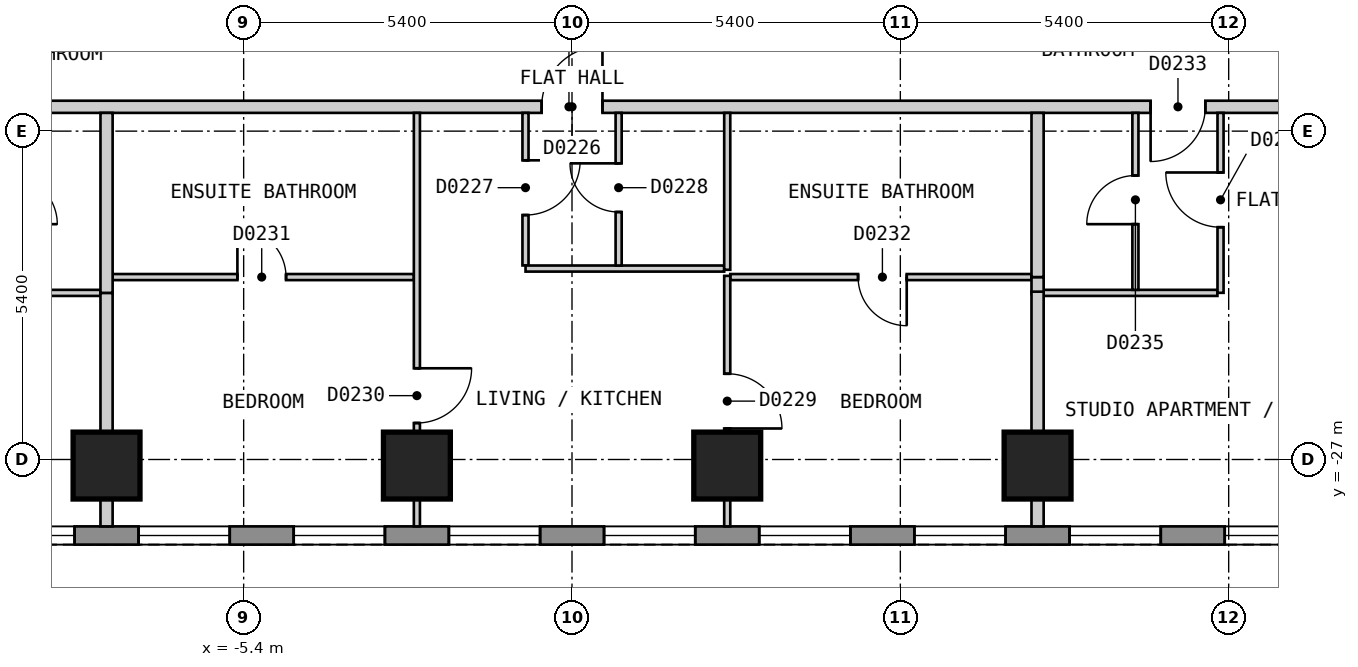
"""IFC4 building model, lengths in metres.
Left out: names, types, materials, properties, quantities, classifications, styles, units other than length and angle.
Written with IfcOpenShell. Run it as: python <this file> out.ifc"""

import sys

from ifc_helpers import new_model, si_unit, direction, frame, frame_2d, origin, origin_2d, place, context, subcontext, project, spatial, polyline, rectangle, outline, extrude, element, fill, save


model = new_model("IFC4")
c1 = context("Model", 3, precision=1e-05, world=origin(), true_north=direction((0.0, 1.0)))
c2 = subcontext(c1, "Body", "Model", "MODEL_VIEW")
j1 = project(units=[si_unit("LENGTHUNIT", "METRE"), si_unit("PLANEANGLEUNIT", "RADIAN")], contexts=[c1])
p1 = place(None, origin())
s1 = spatial("IfcSite", under=j1, at=p1, CompositionType="ELEMENT")
p2 = place(p1, origin())
s2 = spatial("IfcBuilding", under=s1, at=p2, CompositionType="ELEMENT")
p3 = place(p2, frame((0.0, 0.0, 41.4)))
s3 = spatial("IfcBuildingStorey", under=s2, at=p3, CompositionType="ELEMENT", Elevation=41.4)
for number, where, z_axis, x_axis in (
    (1, (-7.655, -27.1, 0.0), (0.0, 0.0, 1.0), (1.0, 0.0, 0.0)),
    (2, (-2.551, -27.1, 0.0), (0.0, 0.0, 1.0), (1.0, 0.0, 0.0)),
    (3, (2.553, -27.1, 0.0), (0.0, 0.0, 1.0), (1.0, 0.0, 0.0)),
    (4, (7.657, -27.1, 0.0), (0.0, 0.0, 1.0), (1.0, 0.0, 0.0)),
):
    element("IfcColumn", number, at=place(p3, frame(where, z_axis=z_axis, x_axis=x_axis)), inside=s3, PredefinedType="COLUMN", context=c2, shape_type="SweptSolid", body=[
        extrude(rectangle(XDim=1.1, YDim=1.1, at=origin_2d()), origin(), (0.0, 0.0, 1.0), 3.0),
    ])
p4 = place(p3, frame((-13.51, -28.25, 0.0), z_axis=(0.0, 0.0, 1.0), x_axis=(1.0, 0.0, 0.0)))
e5 = element("IfcWall", 5, at=p4, inside=s3, PredefinedType="SOLIDWALL", context=c2, shape_type="SweptSolid", body=[
    extrude(outline(polyline([(0.0, -0.15), (27.02, -0.15), (26.94, 0.15), (0.08, 0.15), (0.0, -0.15)])), origin(), (0.0, 0.0, 1.0), 2.7),
])
p5 = place(p4, frame((1.277, 0.0, 0.15)))
e6 = element("IfcOpeningElement", 6, at=p5, cuts=e5, PredefinedType="OPENING", context=c2, shape_type="SweptSolid", body=[
    extrude(rectangle(XDim=1.5, YDim=2.1, at=frame_2d((0.75, 1.05))), frame((0.0, 0.16, 0.0), z_axis=(0.0, -1.0, 0.0), x_axis=(1.0, 0.0, 0.0)), (0.0, 0.0, 1.0), 0.32),
])
p6 = place(p4, frame((3.829, 0.0, 0.15)))
e7 = element("IfcOpeningElement", 7, at=p6, cuts=e5, PredefinedType="OPENING", context=c2, shape_type="SweptSolid", body=[
    extrude(rectangle(XDim=1.5, YDim=2.1, at=frame_2d((0.75, 1.05))), frame((0.0, 0.16, 0.0), z_axis=(0.0, -1.0, 0.0), x_axis=(1.0, 0.0, 0.0)), (0.0, 0.0, 1.0), 0.32),
])
p7 = place(p4, frame((6.381, 0.0, 0.15)))
e8 = element("IfcOpeningElement", 8, at=p7, cuts=e5, PredefinedType="OPENING", context=c2, shape_type="SweptSolid", body=[
    extrude(rectangle(XDim=1.5, YDim=2.1, at=frame_2d((0.75, 1.05))), frame((0.0, 0.16, 0.0), z_axis=(0.0, -1.0, 0.0), x_axis=(1.0, 0.0, 0.0)), (0.0, 0.0, 1.0), 0.32),
])
p8 = place(p4, frame((8.933, 0.0, 0.15)))
e9 = element("IfcOpeningElement", 9, at=p8, cuts=e5, PredefinedType="OPENING", context=c2, shape_type="SweptSolid", body=[
    extrude(rectangle(XDim=1.5, YDim=2.1, at=frame_2d((0.75, 1.05))), frame((0.0, 0.16, 0.0), z_axis=(0.0, -1.0, 0.0), x_axis=(1.0, 0.0, 0.0)), (0.0, 0.0, 1.0), 0.32),
])
p9 = place(p4, frame((11.485, 0.0, 0.15)))
e10 = element("IfcOpeningElement", 10, at=p9, cuts=e5, PredefinedType="OPENING", context=c2, shape_type="SweptSolid", body=[
    extrude(rectangle(XDim=1.5, YDim=2.1, at=frame_2d((0.75, 1.05))), frame((0.0, 0.16, 0.0), z_axis=(0.0, -1.0, 0.0), x_axis=(1.0, 0.0, 0.0)), (0.0, 0.0, 1.0), 0.32),
])
p10 = place(p4, frame((14.037, 0.0, 0.15)))
e11 = element("IfcOpeningElement", 11, at=p10, cuts=e5, PredefinedType="OPENING", context=c2, shape_type="SweptSolid", body=[
    extrude(rectangle(XDim=1.5, YDim=2.1, at=frame_2d((0.75, 1.05))), frame((0.0, 0.16, 0.0), z_axis=(0.0, -1.0, 0.0), x_axis=(1.0, 0.0, 0.0)), (0.0, 0.0, 1.0), 0.32),
])
p11 = place(p4, frame((16.589, 0.0, 0.15)))
e12 = element("IfcOpeningElement", 12, at=p11, cuts=e5, PredefinedType="OPENING", context=c2, shape_type="SweptSolid", body=[
    extrude(rectangle(XDim=1.5, YDim=2.1, at=frame_2d((0.75, 1.05))), frame((0.0, 0.16, 0.0), z_axis=(0.0, -1.0, 0.0), x_axis=(1.0, 0.0, 0.0)), (0.0, 0.0, 1.0), 0.32),
])
p12 = place(p4, frame((19.141, 0.0, 0.15)))
e13 = element("IfcOpeningElement", 13, at=p12, cuts=e5, PredefinedType="OPENING", context=c2, shape_type="SweptSolid", body=[
    extrude(rectangle(XDim=1.5, YDim=2.1, at=frame_2d((0.75, 1.05))), frame((0.0, 0.16, 0.0), z_axis=(0.0, -1.0, 0.0), x_axis=(1.0, 0.0, 0.0)), (0.0, 0.0, 1.0), 0.32),
])
p13 = place(p4, frame((21.693, 0.0, 0.15)))
e14 = element("IfcOpeningElement", 14, at=p13, cuts=e5, PredefinedType="OPENING", context=c2, shape_type="SweptSolid", body=[
    extrude(rectangle(XDim=1.5, YDim=2.1, at=frame_2d((0.75, 1.05))), frame((0.0, 0.16, 0.0), z_axis=(0.0, -1.0, 0.0), x_axis=(1.0, 0.0, 0.0)), (0.0, 0.0, 1.0), 0.32),
])
p14 = place(p4, frame((24.245, 0.0, 0.15)))
e15 = element("IfcOpeningElement", 15, at=p14, cuts=e5, PredefinedType="OPENING", context=c2, shape_type="SweptSolid", body=[
    extrude(rectangle(XDim=1.5, YDim=2.1, at=frame_2d((0.75, 1.05))), frame((0.0, 0.16, 0.0), z_axis=(0.0, -1.0, 0.0), x_axis=(1.0, 0.0, 0.0)), (0.0, 0.0, 1.0), 0.32),
])
p15 = place(p3, frame((-15.499, -21.2, 0.0), z_axis=(0.0, 0.0, 1.0), x_axis=(1.0, 0.0, 0.0)))
e16 = element("IfcWall", 16, at=p15, inside=s3, PredefinedType="PARTITIONING", context=c2, shape_type="SweptSolid", body=[
    extrude(rectangle(XDim=30.898, YDim=0.2, at=frame_2d((15.449, 0.0))), origin(), (0.0, 0.0, 1.0), 2.7),
])
p16 = place(p15, frame((5.084, 0.0, 0.0)))
e17 = element("IfcOpeningElement", 17, at=p16, cuts=e16, PredefinedType="OPENING", context=c2, shape_type="SweptSolid", body=[
    extrude(rectangle(XDim=0.9, YDim=2.1, at=frame_2d((0.45, 1.05))), frame((0.0, 0.11, 0.0), z_axis=(0.0, -1.0, 0.0), x_axis=(1.0, 0.0, 0.0)), (0.0, 0.0, 1.0), 0.22),
])
p17 = place(p15, frame((15.0, 0.0, 0.0)))
e18 = element("IfcOpeningElement", 18, at=p17, cuts=e16, PredefinedType="OPENING", context=c2, shape_type="SweptSolid", body=[
    extrude(rectangle(XDim=1.0, YDim=2.1, at=frame_2d((0.5, 1.05))), frame((0.0, 0.11, 0.0), z_axis=(0.0, -1.0, 0.0), x_axis=(1.0, 0.0, 0.0)), (0.0, 0.0, 1.0), 0.22),
])
p18 = place(p15, frame((25.015, 0.0, 0.0)))
e19 = element("IfcOpeningElement", 19, at=p18, cuts=e16, PredefinedType="OPENING", context=c2, shape_type="SweptSolid", body=[
    extrude(rectangle(XDim=0.9, YDim=2.1, at=frame_2d((0.45, 1.05))), frame((0.0, 0.11, 0.0), z_axis=(0.0, -1.0, 0.0), x_axis=(1.0, 0.0, 0.0)), (0.0, 0.0, 1.0), 0.22),
])
p19 = place(p3, frame((-0.765, -21.3, 0.0), z_axis=(0.0, 0.0, 1.0), x_axis=(0.0, -1.0, 0.0)))
e20 = element("IfcWall", 20, at=p19, inside=s3, PredefinedType="PARTITIONING", context=c2, shape_type="SweptSolid", body=[
    extrude(rectangle(XDim=2.509, YDim=0.1, at=frame_2d((1.254, 0.0))), origin(), (0.0, 0.0, 1.0), 2.7),
])
p20 = place(p19, frame((0.78, 0.0, 0.0)))
e21 = element("IfcOpeningElement", 21, at=p20, cuts=e20, PredefinedType="OPENING", context=c2, shape_type="SweptSolid", body=[
    extrude(rectangle(XDim=0.9, YDim=2.1, at=frame_2d((0.45, 1.05))), frame((0.0, 0.06, 0.0), z_axis=(0.0, -1.0, 0.0), x_axis=(1.0, 0.0, 0.0)), (0.0, 0.0, 1.0), 0.12),
])
p21 = place(p3, frame((-0.764, -23.86, 0.0), z_axis=(0.0, 0.0, 1.0), x_axis=(1.0, 0.0, 0.0)))
e22 = element("IfcWall", 22, at=p21, inside=s3, PredefinedType="PARTITIONING", context=c2, shape_type="SweptSolid", body=[
    extrude(rectangle(XDim=3.267, YDim=0.1, at=frame_2d((1.633, 0.0))), origin(), (0.0, 0.0, 1.0), 2.7),
])
p22 = place(p3, frame((-7.555, -24.0, 0.0), z_axis=(0.0, 0.0, 1.0), x_axis=(1.0, 0.0, 0.0)))
e23 = element("IfcWall", 23, at=p22, inside=s3, PredefinedType="PARTITIONING", context=c2, shape_type="SweptSolid", body=[
    extrude(rectangle(XDim=4.954, YDim=0.1, at=frame_2d((2.477, 0.0))), origin(), (0.0, 0.0, 1.0), 2.7),
])
p23 = place(p22, frame((2.052, 0.0, 0.0)))
e24 = element("IfcOpeningElement", 24, at=p23, cuts=e23, PredefinedType="OPENING", context=c2, shape_type="SweptSolid", body=[
    extrude(rectangle(XDim=0.8, YDim=2.1, at=frame_2d((0.4, 1.05))), frame((0.0, 0.06, 0.0), z_axis=(0.0, -1.0, 0.0), x_axis=(1.0, 0.0, 0.0)), (0.0, 0.0, 1.0), 0.12),
])
p24 = place(p3, frame((2.603, -24.0, 0.0), z_axis=(0.0, 0.0, 1.0), x_axis=(1.0, 0.0, 0.0)))
e25 = element("IfcWall", 25, at=p24, inside=s3, PredefinedType="PARTITIONING", context=c2, shape_type="SweptSolid", body=[
    extrude(rectangle(XDim=4.954, YDim=0.1, at=frame_2d((2.477, 0.0))), origin(), (0.0, 0.0, 1.0), 2.7),
])
p25 = place(p24, frame((2.102, 0.0, 0.0)))
e26 = element("IfcOpeningElement", 26, at=p25, cuts=e25, PredefinedType="OPENING", context=c2, shape_type="SweptSolid", body=[
    extrude(rectangle(XDim=0.8, YDim=2.1, at=frame_2d((0.4, 1.05))), frame((0.0, 0.06, 0.0), z_axis=(0.0, -1.0, 0.0), x_axis=(1.0, 0.0, 0.0)), (0.0, 0.0, 1.0), 0.12),
])
p26 = place(p3, frame((-10.664, -24.26, 0.0), z_axis=(0.0, 0.0, 1.0), x_axis=(1.0, 0.0, 0.0)))
e27 = element("IfcWall", 27, at=p26, inside=s3, PredefinedType="PARTITIONING", context=c2, shape_type="SweptSolid", body=[
    extrude(rectangle(XDim=2.909, YDim=0.1, at=frame_2d((1.455, 0.0))), origin(), (0.0, 0.0, 1.0), 2.7),
])
p27 = place(p3, frame((7.757, -24.26, 0.0), z_axis=(0.0, 0.0, 1.0), x_axis=(1.0, 0.0, 0.0)))
e28 = element("IfcWall", 28, at=p27, inside=s3, PredefinedType="PARTITIONING", context=c2, shape_type="SweptSolid", body=[
    extrude(rectangle(XDim=2.858, YDim=0.1, at=frame_2d((1.429, 0.0))), origin(), (0.0, 0.0, 1.0), 2.7),
])
p28 = place(p3, frame((0.767, -23.81, 0.0), z_axis=(0.0, 0.0, 1.0), x_axis=(0.0, 1.0, 0.0)))
e29 = element("IfcWall", 29, at=p28, inside=s3, PredefinedType="PARTITIONING", context=c2, shape_type="SweptSolid", body=[
    extrude(rectangle(XDim=2.51, YDim=0.1, at=frame_2d((1.255, 0.0))), origin(), (0.0, 0.0, 1.0), 2.7),
])
p29 = place(p28, frame((0.88, 0.0, 0.0)))
e30 = element("IfcOpeningElement", 30, at=p29, cuts=e29, PredefinedType="OPENING", context=c2, shape_type="SweptSolid", body=[
    extrude(rectangle(XDim=0.8, YDim=2.1, at=frame_2d((0.4, 1.05))), frame((0.0, 0.06, 0.0), z_axis=(0.0, -1.0, 0.0), x_axis=(1.0, 0.0, 0.0)), (0.0, 0.0, 1.0), 0.12),
])
p30 = place(p3, frame((9.266, -24.21, 0.0), z_axis=(0.0, 0.0, 1.0), x_axis=(0.0, 1.0, 0.0)))
e31 = element("IfcWall", 31, at=p30, inside=s3, PredefinedType="PARTITIONING", context=c2, shape_type="SweptSolid", body=[
    extrude(rectangle(XDim=2.91, YDim=0.1, at=frame_2d((1.455, 0.0))), origin(), (0.0, 0.0, 1.0), 2.7),
])
p31 = place(p30, frame((1.08, 0.0, 0.0)))
e32 = element("IfcOpeningElement", 32, at=p31, cuts=e31, PredefinedType="OPENING", context=c2, shape_type="SweptSolid", body=[
    extrude(rectangle(XDim=0.8, YDim=2.1, at=frame_2d((0.4, 1.05))), frame((0.0, 0.06, 0.0), z_axis=(0.0, -1.0, 0.0), x_axis=(1.0, 0.0, 0.0)), (0.0, 0.0, 1.0), 0.12),
])
p32 = place(p3, frame((10.666, -24.259, 0.0), z_axis=(0.0, 0.0, 1.0), x_axis=(0.0, 1.0, 0.0)))
e33 = element("IfcWall", 33, at=p32, inside=s3, PredefinedType="PARTITIONING", context=c2, shape_type="SweptSolid", body=[
    extrude(rectangle(XDim=2.959, YDim=0.1, at=frame_2d((1.479, 0.0))), origin(), (0.0, 0.0, 1.0), 2.7),
])
p33 = place(p32, frame((1.079, 0.0, 0.0)))
e34 = element("IfcOpeningElement", 34, at=p33, cuts=e33, PredefinedType="OPENING", context=c2, shape_type="SweptSolid", body=[
    extrude(rectangle(XDim=0.9, YDim=2.1, at=frame_2d((0.45, 1.05))), frame((0.0, 0.06, 0.0), z_axis=(0.0, -1.0, 0.0), x_axis=(1.0, 0.0, 0.0)), (0.0, 0.0, 1.0), 0.12),
])
p34 = place(p3, frame((2.553, -28.1, 0.0), z_axis=(0.0, 0.0, 1.0), x_axis=(0.0, 1.0, 0.0)))
e35 = element("IfcWall", 35, at=p34, inside=s3, PredefinedType="PARTITIONING", context=c2, shape_type="SweptSolid", body=[
    extrude(rectangle(XDim=4.12, YDim=0.1, at=frame_2d((2.06, 0.0))), origin(), (0.0, 0.0, 1.0), 2.7),
])
p35 = place(p34, frame((1.61, 0.0, 0.0)))
e36 = element("IfcOpeningElement", 36, at=p35, cuts=e35, PredefinedType="OPENING", context=c2, shape_type="SweptSolid", body=[
    extrude(rectangle(XDim=0.9, YDim=2.1, at=frame_2d((0.45, 1.05))), frame((0.0, 0.06, 0.0), z_axis=(0.0, -1.0, 0.0), x_axis=(1.0, 0.0, 0.0)), (0.0, 0.0, 1.0), 0.12),
])
p36 = place(p3, frame((2.553, -23.88, 0.0), z_axis=(0.0, 0.0, 1.0), x_axis=(0.0, 1.0, 0.0)))
e37 = element("IfcWall", 37, at=p36, inside=s3, PredefinedType="PARTITIONING", context=c2, shape_type="SweptSolid", body=[
    extrude(rectangle(XDim=2.58, YDim=0.1, at=frame_2d((1.29, 0.0))), origin(), (0.0, 0.0, 1.0), 2.7),
])
p37 = place(p3, frame((-2.551, -28.1, 0.0), z_axis=(0.0, 0.0, 1.0), x_axis=(0.0, 1.0, 0.0)))
e38 = element("IfcWall", 38, at=p37, inside=s3, PredefinedType="PARTITIONING", context=c2, shape_type="SweptSolid", body=[
    extrude(rectangle(XDim=6.8, YDim=0.1, at=frame_2d((3.4, 0.0))), origin(), (0.0, 0.0, 1.0), 2.7),
])
p38 = place(p37, frame((1.7, 0.0, 0.0)))
e39 = element("IfcOpeningElement", 39, at=p38, cuts=e38, PredefinedType="OPENING", context=c2, shape_type="SweptSolid", body=[
    extrude(rectangle(XDim=0.9, YDim=2.1, at=frame_2d((0.45, 1.05))), frame((0.0, 0.06, 0.0), z_axis=(0.0, -1.0, 0.0), x_axis=(1.0, 0.0, 0.0)), (0.0, 0.0, 1.0), 0.12),
])
p39 = place(p3, frame((-7.655, -24.26, 0.0), z_axis=(0.0, 0.0, 1.0), x_axis=(0.0, -1.0, 0.0)))
e40 = element("IfcWall", 40, at=p39, inside=s3, PredefinedType="PARTITIONING", context=c2, shape_type="SweptSolid", body=[
    extrude(rectangle(XDim=3.84, YDim=0.2, at=frame_2d((1.92, 0.0))), origin(), (0.0, 0.0, 1.0), 2.7),
])
p40 = place(p3, frame((7.657, -24.0, 0.0), z_axis=(0.0, 0.0, 1.0), x_axis=(0.0, -1.0, 0.0)))
e41 = element("IfcWall", 41, at=p40, inside=s3, PredefinedType="PARTITIONING", context=c2, shape_type="SweptSolid", body=[
    extrude(rectangle(XDim=0.28, YDim=0.2, at=frame_2d((0.14, 0.0))), origin(), (0.0, 0.0, 1.0), 2.7),
])
p41 = place(p3, frame((7.657, -28.1, 0.0), z_axis=(0.0, 0.0, 1.0), x_axis=(0.0, 1.0, 0.0)))
e42 = element("IfcWall", 42, at=p41, inside=s3, PredefinedType="PARTITIONING", context=c2, shape_type="SweptSolid", body=[
    extrude(rectangle(XDim=3.86, YDim=0.2, at=frame_2d((1.93, 0.0))), origin(), (0.0, 0.0, 1.0), 2.7),
])
p42 = place(p3, frame((7.657, -24.0, 0.0), z_axis=(0.0, 0.0, 1.0), x_axis=(0.0, 1.0, 0.0)))
e43 = element("IfcWall", 43, at=p42, inside=s3, PredefinedType="PARTITIONING", context=c2, shape_type="SweptSolid", body=[
    extrude(rectangle(XDim=2.7, YDim=0.2, at=frame_2d((1.35, 0.0))), origin(), (0.0, 0.0, 1.0), 2.7),
])
p43 = place(p3, frame((-7.655, -24.26, 0.0), z_axis=(0.0, 0.0, 1.0), x_axis=(0.0, 1.0, 0.0)))
e44 = element("IfcWall", 44, at=p43, inside=s3, PredefinedType="PARTITIONING", context=c2, shape_type="SweptSolid", body=[
    extrude(rectangle(XDim=2.96, YDim=0.2, at=frame_2d((1.48, 0.0))), origin(), (0.0, 0.0, 1.0), 2.7),
])
p44 = place(p6, origin())
e45 = element("IfcWindow", 45, at=p44, inside=s3, PartitioningType="SINGLE_PANEL", PredefinedType="WINDOW", context=c2, shape_type="SweptSolid", body=[
    extrude(rectangle(XDim=1.5, YDim=2.1, at=frame_2d((0.75, 1.05))), frame((0.0, 0.03, 0.0), z_axis=(0.0, -1.0, 0.0), x_axis=(1.0, 0.0, 0.0)), (0.0, 0.0, 1.0), 0.06),
])
fill(e7, e45)
p45 = place(p7, origin())
e46 = element("IfcWindow", 46, at=p45, inside=s3, PartitioningType="SINGLE_PANEL", PredefinedType="WINDOW", context=c2, shape_type="SweptSolid", body=[
    extrude(rectangle(XDim=1.5, YDim=2.1, at=frame_2d((0.75, 1.05))), frame((0.0, 0.03, 0.0), z_axis=(0.0, -1.0, 0.0), x_axis=(1.0, 0.0, 0.0)), (0.0, 0.0, 1.0), 0.06),
])
fill(e8, e46)
p46 = place(p8, origin())
e47 = element("IfcWindow", 47, at=p46, inside=s3, PartitioningType="SINGLE_PANEL", PredefinedType="WINDOW", context=c2, shape_type="SweptSolid", body=[
    extrude(rectangle(XDim=1.5, YDim=2.1, at=frame_2d((0.75, 1.05))), frame((0.0, 0.03, 0.0), z_axis=(0.0, -1.0, 0.0), x_axis=(1.0, 0.0, 0.0)), (0.0, 0.0, 1.0), 0.06),
])
fill(e9, e47)
p47 = place(p9, origin())
e48 = element("IfcWindow", 48, at=p47, inside=s3, PartitioningType="SINGLE_PANEL", PredefinedType="WINDOW", context=c2, shape_type="SweptSolid", body=[
    extrude(rectangle(XDim=1.5, YDim=2.1, at=frame_2d((0.75, 1.05))), frame((0.0, 0.03, 0.0), z_axis=(0.0, -1.0, 0.0), x_axis=(1.0, 0.0, 0.0)), (0.0, 0.0, 1.0), 0.06),
])
fill(e10, e48)
p48 = place(p10, origin())
e49 = element("IfcWindow", 49, at=p48, inside=s3, PartitioningType="SINGLE_PANEL", PredefinedType="WINDOW", context=c2, shape_type="SweptSolid", body=[
    extrude(rectangle(XDim=1.5, YDim=2.1, at=frame_2d((0.75, 1.05))), frame((0.0, 0.03, 0.0), z_axis=(0.0, -1.0, 0.0), x_axis=(1.0, 0.0, 0.0)), (0.0, 0.0, 1.0), 0.06),
])
fill(e11, e49)
p49 = place(p11, origin())
e50 = element("IfcWindow", 50, at=p49, inside=s3, PartitioningType="SINGLE_PANEL", PredefinedType="WINDOW", context=c2, shape_type="SweptSolid", body=[
    extrude(rectangle(XDim=1.5, YDim=2.1, at=frame_2d((0.75, 1.05))), frame((0.0, 0.03, 0.0), z_axis=(0.0, -1.0, 0.0), x_axis=(1.0, 0.0, 0.0)), (0.0, 0.0, 1.0), 0.06),
])
fill(e12, e50)
p50 = place(p12, origin())
e51 = element("IfcWindow", 51, at=p50, inside=s3, PartitioningType="SINGLE_PANEL", PredefinedType="WINDOW", context=c2, shape_type="SweptSolid", body=[
    extrude(rectangle(XDim=1.5, YDim=2.1, at=frame_2d((0.75, 1.05))), frame((0.0, 0.03, 0.0), z_axis=(0.0, -1.0, 0.0), x_axis=(1.0, 0.0, 0.0)), (0.0, 0.0, 1.0), 0.06),
])
fill(e13, e51)
p51 = place(p13, origin())
e52 = element("IfcWindow", 52, at=p51, inside=s3, PartitioningType="SINGLE_PANEL", PredefinedType="WINDOW", context=c2, shape_type="SweptSolid", body=[
    extrude(rectangle(XDim=1.5, YDim=2.1, at=frame_2d((0.75, 1.05))), frame((0.0, 0.03, 0.0), z_axis=(0.0, -1.0, 0.0), x_axis=(1.0, 0.0, 0.0)), (0.0, 0.0, 1.0), 0.06),
])
fill(e14, e52)
p52 = place(p14, origin())
e53 = element("IfcWindow", 53, at=p52, inside=s3, PartitioningType="SINGLE_PANEL", PredefinedType="WINDOW", context=c2, shape_type="SweptSolid", body=[
    extrude(rectangle(XDim=1.5, YDim=2.1, at=frame_2d((0.75, 1.05))), frame((0.0, 0.03, 0.0), z_axis=(0.0, -1.0, 0.0), x_axis=(1.0, 0.0, 0.0)), (0.0, 0.0, 1.0), 0.06),
])
fill(e15, e53)
p53 = place(p17, origin())
e54 = element("IfcDoor", 54, at=p53, inside=s3, OperationType="SINGLE_SWING_RIGHT", PredefinedType="DOOR", context=c2, shape_type="SweptSolid", body=[
    extrude(rectangle(XDim=1.0, YDim=2.1, at=frame_2d((0.5, 1.05))), frame((0.0, 0.025, 0.0), z_axis=(0.0, -1.0, 0.0), x_axis=(1.0, 0.0, 0.0)), (0.0, 0.0, 1.0), 0.05),
])
fill(e18, e54)
p54 = place(p20, origin())
e55 = element("IfcDoor", 55, at=p54, inside=s3, OperationType="SINGLE_SWING_LEFT", PredefinedType="DOOR", context=c2, shape_type="SweptSolid", body=[
    extrude(rectangle(XDim=0.9, YDim=2.1, at=frame_2d((0.45, 1.05))), frame((0.0, 0.025, 0.0), z_axis=(0.0, -1.0, 0.0), x_axis=(1.0, 0.0, 0.0)), (0.0, 0.0, 1.0), 0.05),
])
fill(e21, e55)
p55 = place(p29, origin())
e56 = element("IfcDoor", 56, at=p55, inside=s3, OperationType="SINGLE_SWING_RIGHT", PredefinedType="DOOR", context=c2, shape_type="SweptSolid", body=[
    extrude(rectangle(XDim=0.8, YDim=2.1, at=frame_2d((0.4, 1.05))), frame((0.0, 0.025, 0.0), z_axis=(0.0, -1.0, 0.0), x_axis=(1.0, 0.0, 0.0)), (0.0, 0.0, 1.0), 0.05),
])
fill(e30, e56)
p56 = place(p35, origin())
e57 = element("IfcDoor", 57, at=p56, inside=s3, OperationType="SINGLE_SWING_LEFT", PredefinedType="DOOR", context=c2, shape_type="SweptSolid", body=[
    extrude(rectangle(XDim=0.9, YDim=2.1, at=frame_2d((0.45, 1.05))), frame((0.0, 0.025, 0.0), z_axis=(0.0, -1.0, 0.0), x_axis=(1.0, 0.0, 0.0)), (0.0, 0.0, 1.0), 0.05),
])
fill(e36, e57)
p57 = place(p38, origin())
e58 = element("IfcDoor", 58, at=p57, inside=s3, OperationType="SINGLE_SWING_RIGHT", PredefinedType="DOOR", context=c2, shape_type="SweptSolid", body=[
    extrude(rectangle(XDim=0.9, YDim=2.1, at=frame_2d((0.45, 1.05))), frame((0.0, 0.025, 0.0), z_axis=(0.0, -1.0, 0.0), x_axis=(1.0, 0.0, 0.0)), (0.0, 0.0, 1.0), 0.05),
])
fill(e39, e58)
p58 = place(p23, origin())
e59 = element("IfcDoor", 59, at=p58, inside=s3, OperationType="SINGLE_SWING_LEFT", PredefinedType="DOOR", context=c2, shape_type="SweptSolid", body=[
    extrude(rectangle(XDim=0.8, YDim=2.1, at=frame_2d((0.4, 1.05))), frame((0.0, 0.025, 0.0), z_axis=(0.0, -1.0, 0.0), x_axis=(1.0, 0.0, 0.0)), (0.0, 0.0, 1.0), 0.05),
])
fill(e24, e59)
p59 = place(p25, origin())
e60 = element("IfcDoor", 60, at=p59, inside=s3, OperationType="SINGLE_SWING_RIGHT", PredefinedType="DOOR", context=c2, shape_type="SweptSolid", body=[
    extrude(rectangle(XDim=0.8, YDim=2.1, at=frame_2d((0.4, 1.05))), frame((0.0, 0.025, 0.0), z_axis=(0.0, -1.0, 0.0), x_axis=(1.0, 0.0, 0.0)), (0.0, 0.0, 1.0), 0.05),
])
fill(e26, e60)
p60 = place(p18, origin())
e61 = element("IfcDoor", 61, at=p60, inside=s3, OperationType="SINGLE_SWING_LEFT", PredefinedType="DOOR", context=c2, shape_type="SweptSolid", body=[
    extrude(rectangle(XDim=0.9, YDim=2.1, at=frame_2d((0.45, 1.05))), frame((0.0, 0.025, 0.0), z_axis=(0.0, -1.0, 0.0), x_axis=(1.0, 0.0, 0.0)), (0.0, 0.0, 1.0), 0.05),
])
fill(e19, e61)
p61 = place(p33, origin())
e62 = element("IfcDoor", 62, at=p61, inside=s3, OperationType="SINGLE_SWING_RIGHT", PredefinedType="DOOR", context=c2, shape_type="SweptSolid", body=[
    extrude(rectangle(XDim=0.9, YDim=2.1, at=frame_2d((0.45, 1.05))), frame((0.0, 0.025, 0.0), z_axis=(0.0, -1.0, 0.0), x_axis=(1.0, 0.0, 0.0)), (0.0, 0.0, 1.0), 0.05),
])
fill(e34, e62)
p62 = place(p31, origin())
e63 = element("IfcDoor", 63, at=p62, inside=s3, OperationType="SINGLE_SWING_LEFT", PredefinedType="DOOR", context=c2, shape_type="SweptSolid", body=[
    extrude(rectangle(XDim=0.8, YDim=2.1, at=frame_2d((0.4, 1.05))), frame((0.0, 0.025, 0.0), z_axis=(0.0, -1.0, 0.0), x_axis=(1.0, 0.0, 0.0)), (0.0, 0.0, 1.0), 0.05),
])
fill(e32, e63)
save(model, sys.argv[1])
